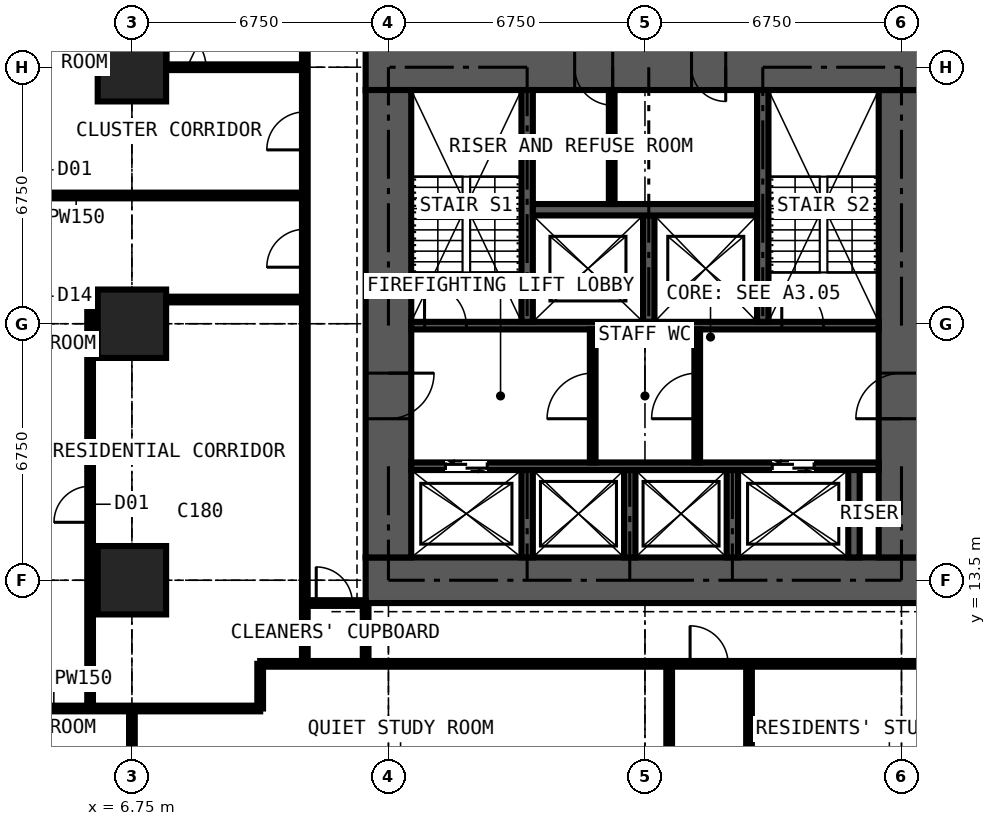
"""IFC4 building model, lengths in metres.
Left out: names, types, materials, properties, quantities, classifications, styles, units other than length and angle.
Written with IfcOpenShell. Run it as: python <this file> out.ifc"""

import sys

from ifc_helpers import new_model, si_unit, direction, frame, frame_2d, origin, origin_2d, place, context, subcontext, project, spatial, rectangle, extrude, element, fill, save


model = new_model("IFC4")
c1 = context("Model", 3, precision=1e-05, world=origin(), true_north=direction((0.0, 1.0)))
c2 = subcontext(c1, "Body", "Model", "MODEL_VIEW")
j1 = project(units=[si_unit("LENGTHUNIT", "METRE"), si_unit("PLANEANGLEUNIT", "RADIAN")], contexts=[c1])
p1 = place(None, origin())
s1 = spatial("IfcSite", under=j1, at=p1, CompositionType="ELEMENT")
p2 = place(p1, origin())
s2 = spatial("IfcBuilding", under=s1, at=p2, CompositionType="ELEMENT")
p3 = place(p2, frame((0.0, 0.0, 94.5)))
s3 = spatial("IfcBuildingStorey", under=s2, at=p3, CompositionType="ELEMENT", Elevation=94.5)
for number, where, z_axis, x_axis in (
    (1, (6.75, 13.5, 0.0), (0.0, 0.0, 1.0), (1.0, 0.0, 0.0)),
    (2, (6.75, 20.25, 0.0), (0.0, 0.0, 1.0), (1.0, 0.0, 0.0)),
    (3, (6.75, 27.0, 0.0), (0.0, 0.0, 1.0), (1.0, 0.0, 0.0)),
):
    element("IfcColumn", number, at=place(p3, frame(where, z_axis=z_axis, x_axis=x_axis)), inside=s3, PredefinedType="COLUMN", context=c2, shape_type="SweptSolid", body=[
        extrude(rectangle(XDim=1.8, YDim=1.8, at=origin_2d()), origin(), (0.0, 0.0, 1.0), 3.6),
    ])
p4 = place(p3, frame((12.9, 13.5, 0.0), z_axis=(0.0, 0.0, 1.0), x_axis=(1.0, 0.0, 0.0)))
e4 = element("IfcWall", 4, at=p4, inside=s3, PredefinedType="SHEAR", context=c2, shape_type="SweptSolid", body=[
    extrude(rectangle(XDim=14.7, YDim=1.2, at=frame_2d((7.35, 0.0))), origin(), (0.0, 0.0, 1.0), 3.6),
])
p5 = place(p3, frame((27.0, 14.1, 0.0), z_axis=(0.0, 0.0, 1.0), x_axis=(0.0, 1.0, 0.0)))
e5 = element("IfcWall", 5, at=p5, inside=s3, PredefinedType="SHEAR", context=c2, shape_type="SweptSolid", body=[
    extrude(rectangle(XDim=12.3, YDim=1.2, at=frame_2d((6.15, 0.0))), origin(), (0.0, 0.0, 1.0), 3.6),
])
p6 = place(p5, frame((3.65, 0.0, 0.0)))
e6 = element("IfcOpeningElement", 6, at=p6, cuts=e5, PredefinedType="OPENING", context=c2, shape_type="SweptSolid", body=[
    extrude(rectangle(XDim=1.2, YDim=2.2, at=frame_2d((0.6, 1.1))), frame((0.0, 0.61, 0.0), z_axis=(0.0, -1.0, 0.0), x_axis=(1.0, 0.0, 0.0)), (0.0, 0.0, 1.0), 1.22),
])
p7 = place(p3, frame((27.6, 27.0, 0.0), z_axis=(0.0, 0.0, 1.0), x_axis=(-1.0, 0.0, 0.0)))
e7 = element("IfcWall", 7, at=p7, inside=s3, PredefinedType="SHEAR", context=c2, shape_type="SweptSolid", body=[
    extrude(rectangle(XDim=14.7, YDim=1.2, at=frame_2d((7.35, 0.0))), origin(), (0.0, 0.0, 1.0), 3.6),
])
p8 = place(p7, frame((5.225, 0.0, 0.0)))
e8 = element("IfcOpeningElement", 8, at=p8, cuts=e7, PredefinedType="OPENING", context=c2, shape_type="SweptSolid", body=[
    extrude(rectangle(XDim=0.9, YDim=2.2, at=frame_2d((0.45, 1.1))), frame((0.0, 0.61, 0.0), z_axis=(0.0, -1.0, 0.0), x_axis=(1.0, 0.0, 0.0)), (0.0, 0.0, 1.0), 1.22),
])
p9 = place(p7, frame((8.2, 0.0, 0.0)))
e9 = element("IfcOpeningElement", 9, at=p9, cuts=e7, PredefinedType="OPENING", context=c2, shape_type="SweptSolid", body=[
    extrude(rectangle(XDim=1.0, YDim=2.2, at=frame_2d((0.5, 1.1))), frame((0.0, 0.61, 0.0), z_axis=(0.0, -1.0, 0.0), x_axis=(1.0, 0.0, 0.0)), (0.0, 0.0, 1.0), 1.22),
])
p10 = place(p3, frame((13.5, 26.4, 0.0), z_axis=(0.0, 0.0, 1.0), x_axis=(0.0, -1.0, 0.0)))
e10 = element("IfcWall", 10, at=p10, inside=s3, PredefinedType="SHEAR", context=c2, shape_type="SweptSolid", body=[
    extrude(rectangle(XDim=12.3, YDim=1.2, at=frame_2d((6.15, 0.0))), origin(), (0.0, 0.0, 1.0), 3.6),
])
p11 = place(p10, frame((7.45, 0.0, 0.0)))
e11 = element("IfcOpeningElement", 11, at=p11, cuts=e10, PredefinedType="OPENING", context=c2, shape_type="SweptSolid", body=[
    extrude(rectangle(XDim=1.2, YDim=2.2, at=frame_2d((0.6, 1.1))), frame((0.0, 0.61, 0.0), z_axis=(0.0, -1.0, 0.0), x_axis=(1.0, 0.0, 0.0)), (0.0, 0.0, 1.0), 1.22),
])
p12 = place(p3, frame((14.1, 16.5, 0.0), z_axis=(0.0, 0.0, 1.0), x_axis=(1.0, 0.0, 0.0)))
e12 = element("IfcWall", 12, at=p12, inside=s3, PredefinedType="SHEAR", context=c2, shape_type="SweptSolid", body=[
    extrude(rectangle(XDim=12.3, YDim=0.2, at=frame_2d((6.15, 0.0))), origin(), (0.0, 0.0, 1.0), 3.6),
])
p13 = place(p12, frame((0.9, 0.0, 0.0)))
e13 = element("IfcOpeningElement", 13, at=p13, cuts=e12, PredefinedType="OPENING", context=c2, shape_type="SweptSolid", body=[
    extrude(rectangle(XDim=1.1, YDim=2.2, at=frame_2d((0.55, 1.1))), frame((0.0, 0.11, 0.0), z_axis=(0.0, -1.0, 0.0), x_axis=(1.0, 0.0, 0.0)), (0.0, 0.0, 1.0), 0.22),
])
p14 = place(p12, frame((9.5, 0.0, 0.0)))
e14 = element("IfcOpeningElement", 14, at=p14, cuts=e12, PredefinedType="OPENING", context=c2, shape_type="SweptSolid", body=[
    extrude(rectangle(XDim=1.1, YDim=2.2, at=frame_2d((0.55, 1.1))), frame((0.0, 0.11, 0.0), z_axis=(0.0, -1.0, 0.0), x_axis=(1.0, 0.0, 0.0)), (0.0, 0.0, 1.0), 0.22),
])
p15 = place(p3, frame((14.1, 20.2, 0.0), z_axis=(0.0, 0.0, 1.0), x_axis=(1.0, 0.0, 0.0)))
e15 = element("IfcWall", 15, at=p15, inside=s3, PredefinedType="SHEAR", context=c2, shape_type="SweptSolid", body=[
    extrude(rectangle(XDim=12.3, YDim=0.2, at=frame_2d((6.15, 0.0))), origin(), (0.0, 0.0, 1.0), 3.6),
])
p16 = place(p15, frame((0.35, 0.0, 0.0)))
e16 = element("IfcOpeningElement", 16, at=p16, cuts=e15, PredefinedType="OPENING", context=c2, shape_type="SweptSolid", body=[
    extrude(rectangle(XDim=1.1, YDim=2.2, at=frame_2d((0.55, 1.1))), frame((0.0, 0.11, 0.0), z_axis=(0.0, -1.0, 0.0), x_axis=(1.0, 0.0, 0.0)), (0.0, 0.0, 1.0), 0.22),
])
p17 = place(p15, frame((9.75, 0.0, 0.0)))
e17 = element("IfcOpeningElement", 17, at=p17, cuts=e15, PredefinedType="OPENING", context=c2, shape_type="SweptSolid", body=[
    extrude(rectangle(XDim=1.1, YDim=2.2, at=frame_2d((0.55, 1.1))), frame((0.0, 0.11, 0.0), z_axis=(0.0, -1.0, 0.0), x_axis=(1.0, 0.0, 0.0)), (0.0, 0.0, 1.0), 0.22),
])
for number, where, z_axis, x_axis in (
    (18, (17.15, 20.3, 0.0), (0.0, 0.0, 1.0), (0.0, 1.0, 0.0)),
    (19, (23.35, 20.3, 0.0), (0.0, 0.0, 1.0), (0.0, 1.0, 0.0)),
):
    element("IfcWall", number, at=place(p3, frame(where, z_axis=z_axis, x_axis=x_axis)), inside=s3, PredefinedType="SHEAR", context=c2, shape_type="SweptSolid", body=[
        extrude(rectangle(XDim=6.1, YDim=0.3, at=frame_2d((3.05, 0.0))), origin(), (0.0, 0.0, 1.0), 3.6),
    ])
p18 = place(p3, frame((20.35, 20.3, 0.0), z_axis=(0.0, 0.0, 1.0), x_axis=(0.0, 1.0, 0.0)))
e20 = element("IfcWall", 20, at=p18, inside=s3, PredefinedType="SHEAR", context=c2, shape_type="SweptSolid", body=[
    extrude(rectangle(XDim=2.8, YDim=0.3, at=frame_2d((1.4, 0.0))), origin(), (0.0, 0.0, 1.0), 3.6),
])
p19 = place(p3, frame((17.3, 23.25, 0.0), z_axis=(0.0, 0.0, 1.0), x_axis=(1.0, 0.0, 0.0)))
e21 = element("IfcWall", 21, at=p19, inside=s3, PredefinedType="SHEAR", context=c2, shape_type="SweptSolid", body=[
    extrude(rectangle(XDim=5.9, YDim=0.3, at=frame_2d((2.95, 0.0))), origin(), (0.0, 0.0, 1.0), 3.6),
])
for number, where, z_axis, x_axis in (
    (22, (17.15, 14.1, 0.0), (0.0, 0.0, 1.0), (0.0, 1.0, 0.0)),
    (23, (19.85, 14.1, 0.0), (0.0, 0.0, 1.0), (0.0, 1.0, 0.0)),
    (24, (22.55, 14.1, 0.0), (0.0, 0.0, 1.0), (0.0, 1.0, 0.0)),
    (25, (25.75, 14.1, 0.0), (0.0, 0.0, 1.0), (0.0, 1.0, 0.0)),
):
    element("IfcWall", number, at=place(p3, frame(where, z_axis=z_axis, x_axis=x_axis)), inside=s3, PredefinedType="SHEAR", context=c2, shape_type="SweptSolid", body=[
        extrude(rectangle(XDim=2.3, YDim=0.3, at=frame_2d((1.15, 0.0))), origin(), (0.0, 0.0, 1.0), 3.6),
    ])
p20 = place(p3, frame((18.875, 16.6, 0.0), z_axis=(0.0, 0.0, 1.0), x_axis=(0.0, 1.0, 0.0)))
e26 = element("IfcWall", 26, at=p20, inside=s3, PredefinedType="PARTITIONING", context=c2, shape_type="SweptSolid", body=[
    extrude(rectangle(XDim=3.5, YDim=0.15, at=frame_2d((1.75, 0.0))), origin(), (0.0, 0.0, 1.0), 3.375),
])
p21 = place(p20, frame((1.15, 0.0, 0.0)))
e27 = element("IfcOpeningElement", 27, at=p21, cuts=e26, PredefinedType="OPENING", context=c2, shape_type="SweptSolid", body=[
    extrude(rectangle(XDim=1.2, YDim=2.2, at=frame_2d((0.6, 1.1))), frame((0.0, 0.085, 0.0), z_axis=(0.0, -1.0, 0.0), x_axis=(1.0, 0.0, 0.0)), (0.0, 0.0, 1.0), 0.17),
])
p22 = place(p3, frame((21.625, 16.6, 0.0), z_axis=(0.0, 0.0, 1.0), x_axis=(0.0, 1.0, 0.0)))
e28 = element("IfcWall", 28, at=p22, inside=s3, PredefinedType="PARTITIONING", context=c2, shape_type="SweptSolid", body=[
    extrude(rectangle(XDim=3.5, YDim=0.15, at=frame_2d((1.75, 0.0))), origin(), (0.0, 0.0, 1.0), 3.375),
])
p23 = place(p22, frame((1.15, 0.0, 0.0)))
e29 = element("IfcOpeningElement", 29, at=p23, cuts=e28, PredefinedType="OPENING", context=c2, shape_type="SweptSolid", body=[
    extrude(rectangle(XDim=1.2, YDim=2.2, at=frame_2d((0.6, 1.1))), frame((0.0, 0.085, 0.0), z_axis=(0.0, -1.0, 0.0), x_axis=(1.0, 0.0, 0.0)), (0.0, 0.0, 1.0), 0.17),
])
p24 = place(p3, frame((19.375, 23.4, 0.0), z_axis=(0.0, 0.0, 1.0), x_axis=(0.0, 1.0, 0.0)))
e30 = element("IfcWall", 30, at=p24, inside=s3, PredefinedType="PARTITIONING", context=c2, shape_type="SweptSolid", body=[
    extrude(rectangle(XDim=3.0, YDim=0.15, at=frame_2d((1.5, 0.0))), origin(), (0.0, 0.0, 1.0), 3.375),
])
p25 = place(p3, frame((-0.734, 10.125, 0.0), z_axis=(0.0, 0.0, 1.0), x_axis=(1.0, 0.0, 0.0)))
e31 = element("IfcWall", 31, at=p25, inside=s3, PredefinedType="PARTITIONING", context=c2, shape_type="SweptSolid", body=[
    extrude(rectangle(XDim=10.859, YDim=0.15, at=frame_2d((5.429, 0.0))), origin(), (0.0, 0.0, 1.0), 3.375),
])
p26 = place(p3, frame((-0.734, 23.625, 0.0), z_axis=(0.0, 0.0, 1.0), x_axis=(1.0, 0.0, 0.0)))
e32 = element("IfcWall", 32, at=p26, inside=s3, PredefinedType="PARTITIONING", context=c2, shape_type="SweptSolid", body=[
    extrude(rectangle(XDim=12.034, YDim=0.15, at=frame_2d((6.017, 0.0))), origin(), (0.0, 0.0, 1.0), 3.375),
])
p27 = place(p3, frame((-0.734, 27.0, 0.0), z_axis=(0.0, 0.0, 1.0), x_axis=(1.0, 0.0, 0.0)))
e33 = element("IfcWall", 33, at=p27, inside=s3, PredefinedType="PARTITIONING", context=c2, shape_type="SweptSolid", body=[
    extrude(rectangle(XDim=12.034, YDim=0.15, at=frame_2d((6.017, 0.0))), origin(), (0.0, 0.0, 1.0), 2.806),
])
p28 = place(p27, frame((8.434, 0.0, 0.0)))
e34 = element("IfcOpeningElement", 34, at=p28, cuts=e33, PredefinedType="OPENING", context=c2, shape_type="SweptSolid", body=[
    extrude(rectangle(XDim=1.0, YDim=2.2, at=frame_2d((0.5, 1.1))), frame((0.0, 0.085, 0.0), z_axis=(0.0, -1.0, 0.0), x_axis=(1.0, 0.0, 0.0)), (0.0, 0.0, 1.0), 0.17),
])
p29 = place(p3, frame((5.65, 10.125, 0.0), z_axis=(0.0, 0.0, 1.0), x_axis=(0.0, 1.0, 0.0)))
e35 = element("IfcWall", 35, at=p29, inside=s3, PredefinedType="PARTITIONING", context=c2, shape_type="SweptSolid", body=[
    extrude(rectangle(XDim=10.762, YDim=0.15, at=frame_2d((5.381, 0.0))), origin(), (0.0, 0.0, 1.0), 3.375),
])
p30 = place(p29, frame((4.9, 0.0, 0.0)))
e36 = element("IfcOpeningElement", 36, at=p30, cuts=e35, PredefinedType="OPENING", context=c2, shape_type="SweptSolid", body=[
    extrude(rectangle(XDim=0.95, YDim=2.2, at=frame_2d((0.475, 1.1))), frame((0.0, 0.085, 0.0), z_axis=(0.0, -1.0, 0.0), x_axis=(1.0, 0.0, 0.0)), (0.0, 0.0, 1.0), 0.17),
])
p31 = place(p3, frame((5.65, 20.887, 0.0), z_axis=(0.0, 0.0, 1.0), x_axis=(1.0, 0.0, 0.0)))
e37 = element("IfcWall", 37, at=p31, inside=s3, PredefinedType="PARTITIONING", context=c2, shape_type="SweptSolid", body=[
    extrude(rectangle(XDim=5.65, YDim=0.15, at=frame_2d((2.825, 0.0))), origin(), (0.0, 0.0, 1.0), 3.375),
])
p32 = place(p3, frame((6.75, 4.15, 0.0), z_axis=(0.0, 0.0, 1.0), x_axis=(0.0, 1.0, 0.0)))
e38 = element("IfcWall", 38, at=p32, inside=s3, PredefinedType="PARTITIONING", context=c2, shape_type="SweptSolid", body=[
    extrude(rectangle(XDim=5.975, YDim=0.15, at=frame_2d((2.988, 0.0))), origin(), (0.0, 0.0, 1.0), 2.877),
])
p33 = place(p3, frame((10.125, 10.125, 0.0), z_axis=(0.0, 0.0, 1.0), x_axis=(0.0, 1.0, 0.0)))
e39 = element("IfcWall", 39, at=p33, inside=s3, PredefinedType="PARTITIONING", context=c2, shape_type="SweptSolid", body=[
    extrude(rectangle(XDim=1.175, YDim=0.15, at=frame_2d((0.587, 0.0))), origin(), (0.0, 0.0, 1.0), 3.375),
])
p34 = place(p3, frame((10.125, 11.3, 0.0), z_axis=(0.0, 0.0, 1.0), x_axis=(1.0, 0.0, 0.0)))
e40 = element("IfcWall", 40, at=p34, inside=s3, PredefinedType="PARTITIONING", context=c2, shape_type="SweptSolid", body=[
    extrude(rectangle(XDim=20.675, YDim=0.15, at=frame_2d((10.337, 0.0))), origin(), (0.0, 0.0, 1.0), 3.375),
])
p35 = place(p34, frame((11.312, 0.0, 0.0)))
e41 = element("IfcOpeningElement", 41, at=p35, cuts=e40, PredefinedType="OPENING", context=c2, shape_type="SweptSolid", body=[
    extrude(rectangle(XDim=1.0, YDim=2.2, at=frame_2d((0.5, 1.1))), frame((0.0, 0.085, 0.0), z_axis=(0.0, -1.0, 0.0), x_axis=(1.0, 0.0, 0.0)), (0.0, 0.0, 1.0), 0.17),
])
p36 = place(p3, frame((11.3, 11.3, 0.0), z_axis=(0.0, 0.0, 1.0), x_axis=(0.0, 1.0, 0.0)))
e42 = element("IfcWall", 42, at=p36, inside=s3, PredefinedType="PARTITIONING", context=c2, shape_type="SweptSolid", body=[
    extrude(rectangle(XDim=19.3, YDim=0.15, at=frame_2d((9.65, 0.0))), origin(), (0.0, 0.0, 1.0), 3.375),
])
p37 = place(p36, frame((13.525, 0.0, 0.0)))
e43 = element("IfcOpeningElement", 43, at=p37, cuts=e42, PredefinedType="OPENING", context=c2, shape_type="SweptSolid", body=[
    extrude(rectangle(XDim=1.0, YDim=2.2, at=frame_2d((0.5, 1.1))), frame((0.0, 0.085, 0.0), z_axis=(0.0, -1.0, 0.0), x_axis=(1.0, 0.0, 0.0)), (0.0, 0.0, 1.0), 0.17),
])
p38 = place(p36, frame((10.438, 0.0, 0.0)))
e44 = element("IfcOpeningElement", 44, at=p38, cuts=e42, PredefinedType="OPENING", context=c2, shape_type="SweptSolid", body=[
    extrude(rectangle(XDim=1.0, YDim=2.2, at=frame_2d((0.5, 1.1))), frame((0.0, 0.085, 0.0), z_axis=(0.0, -1.0, 0.0), x_axis=(1.0, 0.0, 0.0)), (0.0, 0.0, 1.0), 0.17),
])
p39 = place(p3, frame((11.3, 12.9, 0.0), z_axis=(0.0, 0.0, 1.0), x_axis=(1.0, 0.0, 0.0)))
e45 = element("IfcWall", 45, at=p39, inside=s3, PredefinedType="PARTITIONING", context=c2, shape_type="SweptSolid", body=[
    extrude(rectangle(XDim=1.6, YDim=0.15, at=frame_2d((0.8, 0.0))), origin(), (0.0, 0.0, 1.0), 2.806),
])
p40 = place(p39, frame((0.3, 0.0, 0.0)))
e46 = element("IfcOpeningElement", 46, at=p40, cuts=e45, PredefinedType="OPENING", context=c2, shape_type="SweptSolid", body=[
    extrude(rectangle(XDim=0.95, YDim=2.2, at=frame_2d((0.475, 1.1))), frame((0.0, 0.085, 0.0), z_axis=(0.0, -1.0, 0.0), x_axis=(1.0, 0.0, 0.0)), (0.0, 0.0, 1.0), 0.17),
])
p41 = place(p3, frame((12.9, 11.3, 0.0), z_axis=(0.0, 0.0, 1.0), x_axis=(0.0, 1.0, 0.0)))
e47 = element("IfcWall", 47, at=p41, inside=s3, PredefinedType="PARTITIONING", context=c2, shape_type="SweptSolid", body=[
    extrude(rectangle(XDim=1.6, YDim=0.15, at=frame_2d((0.8, 0.0))), origin(), (0.0, 0.0, 1.0), 3.375),
])
for number, where, z_axis, x_axis in (
    (48, (20.887, 5.65, 0.0), (0.0, 0.0, 1.0), (0.0, 1.0, 0.0)),
    (49, (22.988, 5.65, 0.0), (0.0, 0.0, 1.0), (0.0, 1.0, 0.0)),
):
    element("IfcWall", number, at=place(p3, frame(where, z_axis=z_axis, x_axis=x_axis)), inside=s3, PredefinedType="PARTITIONING", context=c2, shape_type="SweptSolid", body=[
        extrude(rectangle(XDim=5.65, YDim=0.15, at=frame_2d((2.825, 0.0))), origin(), (0.0, 0.0, 1.0), 3.375),
    ])
p42 = place(p13, origin())
e50 = element("IfcDoor", 50, at=p42, inside=s3, OperationType="DOUBLE_DOOR_SLIDING", PredefinedType="DOOR", context=c2, shape_type="SweptSolid", body=[
    extrude(rectangle(XDim=1.1, YDim=2.2, at=frame_2d((0.55, 1.1))), frame((0.0, 0.025, 0.0), z_axis=(0.0, -1.0, 0.0), x_axis=(1.0, 0.0, 0.0)), (0.0, 0.0, 1.0), 0.05),
])
fill(e13, e50)
p43 = place(p14, origin())
e51 = element("IfcDoor", 51, at=p43, inside=s3, OperationType="DOUBLE_DOOR_SLIDING", PredefinedType="DOOR", context=c2, shape_type="SweptSolid", body=[
    extrude(rectangle(XDim=1.1, YDim=2.2, at=frame_2d((0.55, 1.1))), frame((0.0, 0.025, 0.0), z_axis=(0.0, -1.0, 0.0), x_axis=(1.0, 0.0, 0.0)), (0.0, 0.0, 1.0), 0.05),
])
fill(e14, e51)
p44 = place(p11, origin())
e52 = element("IfcDoor", 52, at=p44, inside=s3, OperationType="DOUBLE_DOOR_SINGLE_SWING", PredefinedType="DOOR", context=c2, shape_type="SweptSolid", body=[
    extrude(rectangle(XDim=1.2, YDim=2.2, at=frame_2d((0.6, 1.1))), frame((0.0, 0.025, 0.0), z_axis=(0.0, -1.0, 0.0), x_axis=(1.0, 0.0, 0.0)), (0.0, 0.0, 1.0), 0.05),
])
fill(e11, e52)
p45 = place(p6, origin())
e53 = element("IfcDoor", 53, at=p45, inside=s3, OperationType="DOUBLE_DOOR_SINGLE_SWING", PredefinedType="DOOR", context=c2, shape_type="SweptSolid", body=[
    extrude(rectangle(XDim=1.2, YDim=2.2, at=frame_2d((0.6, 1.1))), frame((0.0, 0.025, 0.0), z_axis=(0.0, -1.0, 0.0), x_axis=(1.0, 0.0, 0.0)), (0.0, 0.0, 1.0), 0.05),
])
fill(e6, e53)
p46 = place(p21, origin())
e54 = element("IfcDoor", 54, at=p46, inside=s3, OperationType="DOUBLE_DOOR_SINGLE_SWING", PredefinedType="DOOR", context=c2, shape_type="SweptSolid", body=[
    extrude(rectangle(XDim=1.2, YDim=2.2, at=frame_2d((0.6, 1.1))), frame((0.0, 0.025, 0.0), z_axis=(0.0, -1.0, 0.0), x_axis=(1.0, 0.0, 0.0)), (0.0, 0.0, 1.0), 0.05),
])
fill(e27, e54)
p47 = place(p23, origin())
e55 = element("IfcDoor", 55, at=p47, inside=s3, OperationType="DOUBLE_DOOR_SINGLE_SWING", PredefinedType="DOOR", context=c2, shape_type="SweptSolid", body=[
    extrude(rectangle(XDim=1.2, YDim=2.2, at=frame_2d((0.6, 1.1))), frame((0.0, 0.025, 0.0), z_axis=(0.0, -1.0, 0.0), x_axis=(1.0, 0.0, 0.0)), (0.0, 0.0, 1.0), 0.05),
])
fill(e29, e55)
p48 = place(p8, origin())
e56 = element("IfcDoor", 56, at=p48, inside=s3, OperationType="SINGLE_SWING_LEFT", PredefinedType="DOOR", context=c2, shape_type="SweptSolid", body=[
    extrude(rectangle(XDim=0.9, YDim=2.2, at=frame_2d((0.45, 1.1))), frame((0.0, 0.4, 0.0), z_axis=(0.0, -1.0, 0.0), x_axis=(1.0, 0.0, 0.0)), (0.0, 0.0, 1.0), 0.8),
])
fill(e8, e56)
p49 = place(p9, origin())
e57 = element("IfcDoor", 57, at=p49, inside=s3, OperationType="SINGLE_SWING_LEFT", PredefinedType="DOOR", context=c2, shape_type="SweptSolid", body=[
    extrude(rectangle(XDim=1.0, YDim=2.2, at=frame_2d((0.5, 1.1))), frame((0.0, 0.025, 0.0), z_axis=(0.0, -1.0, 0.0), x_axis=(1.0, 0.0, 0.0)), (0.0, 0.0, 1.0), 0.05),
])
fill(e9, e57)
p50 = place(p16, origin())
e58 = element("IfcDoor", 58, at=p50, inside=s3, OperationType="SINGLE_SWING_LEFT", PredefinedType="DOOR", context=c2, shape_type="SweptSolid", body=[
    extrude(rectangle(XDim=1.1, YDim=2.2, at=frame_2d((0.55, 1.1))), frame((0.0, 0.025, 0.0), z_axis=(0.0, -1.0, 0.0), x_axis=(1.0, 0.0, 0.0)), (0.0, 0.0, 1.0), 0.05),
])
fill(e16, e58)
p51 = place(p17, origin())
e59 = element("IfcDoor", 59, at=p51, inside=s3, OperationType="SINGLE_SWING_LEFT", PredefinedType="DOOR", context=c2, shape_type="SweptSolid", body=[
    extrude(rectangle(XDim=1.1, YDim=2.2, at=frame_2d((0.55, 1.1))), frame((0.0, 0.025, 0.0), z_axis=(0.0, -1.0, 0.0), x_axis=(1.0, 0.0, 0.0)), (0.0, 0.0, 1.0), 0.05),
])
fill(e17, e59)
p52 = place(p40, origin())
e60 = element("IfcDoor", 60, at=p52, inside=s3, OperationType="SINGLE_SWING_LEFT", PredefinedType="DOOR", context=c2, shape_type="SweptSolid", body=[
    extrude(rectangle(XDim=0.95, YDim=2.2, at=frame_2d((0.475, 1.1))), frame((0.0, 0.025, 0.0), z_axis=(0.0, -1.0, 0.0), x_axis=(1.0, 0.0, 0.0)), (0.0, 0.0, 1.0), 0.05),
])
fill(e46, e60)
p53 = place(p35, origin())
e61 = element("IfcDoor", 61, at=p53, inside=s3, OperationType="SINGLE_SWING_LEFT", PredefinedType="DOOR", context=c2, shape_type="SweptSolid", body=[
    extrude(rectangle(XDim=1.0, YDim=2.2, at=frame_2d((0.5, 1.1))), frame((0.0, 0.025, 0.0), z_axis=(0.0, -1.0, 0.0), x_axis=(1.0, 0.0, 0.0)), (0.0, 0.0, 1.0), 0.05),
])
fill(e41, e61)
p54 = place(p28, origin())
e62 = element("IfcDoor", 62, at=p54, inside=s3, OperationType="SINGLE_SWING_LEFT", PredefinedType="DOOR", context=c2, shape_type="SweptSolid", body=[
    extrude(rectangle(XDim=1.0, YDim=2.2, at=frame_2d((0.5, 1.1))), frame((0.0, 0.025, 0.0), z_axis=(0.0, -1.0, 0.0), x_axis=(1.0, 0.0, 0.0)), (0.0, 0.0, 1.0), 0.05),
])
fill(e34, e62)
p55 = place(p37, origin())
e63 = element("IfcDoor", 63, at=p55, inside=s3, OperationType="SINGLE_SWING_LEFT", PredefinedType="DOOR", context=c2, shape_type="SweptSolid", body=[
    extrude(rectangle(XDim=1.0, YDim=2.2, at=frame_2d((0.5, 1.1))), frame((0.0, 0.025, 0.0), z_axis=(0.0, -1.0, 0.0), x_axis=(1.0, 0.0, 0.0)), (0.0, 0.0, 1.0), 0.05),
])
fill(e43, e63)
p56 = place(p38, origin())
e64 = element("IfcDoor", 64, at=p56, inside=s3, OperationType="SINGLE_SWING_LEFT", PredefinedType="DOOR", context=c2, shape_type="SweptSolid", body=[
    extrude(rectangle(XDim=1.0, YDim=2.2, at=frame_2d((0.5, 1.1))), frame((0.0, 0.025, 0.0), z_axis=(0.0, -1.0, 0.0), x_axis=(1.0, 0.0, 0.0)), (0.0, 0.0, 1.0), 0.05),
])
fill(e44, e64)
p57 = place(p30, origin())
e65 = element("IfcDoor", 65, at=p57, inside=s3, OperationType="SINGLE_SWING_LEFT", PredefinedType="DOOR", context=c2, shape_type="SweptSolid", body=[
    extrude(rectangle(XDim=0.95, YDim=2.2, at=frame_2d((0.475, 1.1))), frame((0.0, 0.025, 0.0), z_axis=(0.0, -1.0, 0.0), x_axis=(1.0, 0.0, 0.0)), (0.0, 0.0, 1.0), 0.05),
])
fill(e36, e65)
save(model, sys.argv[1])
